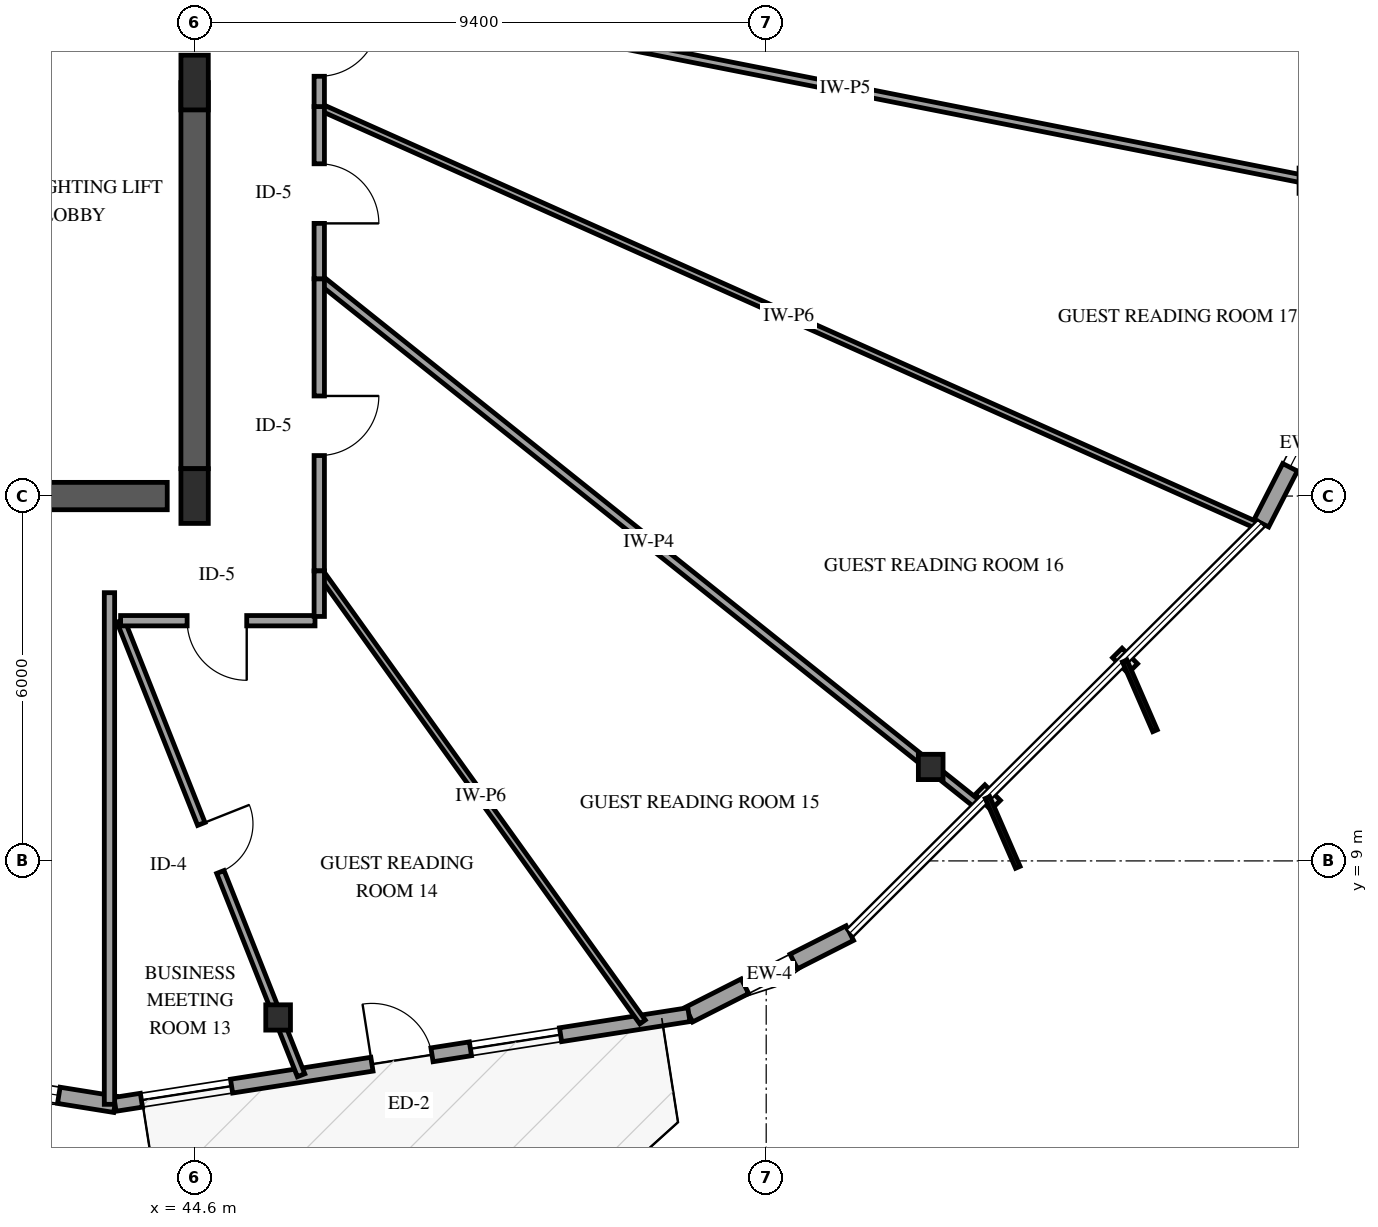
"""IFC4 building model, lengths in metres.
Left out: names, types, materials, properties, quantities, classifications, styles, units other than length and angle.
Written with IfcOpenShell. Run it as: python <this file> out.ifc"""

import sys

from ifc_helpers import new_model, si_unit, direction, frame, frame_2d, origin, origin_2d, place, context, subcontext, project, spatial, rectangle, i_section, extrude, element, fill, save


model = new_model("IFC4")
c1 = context("Model", 3, precision=1e-05, world=origin(), true_north=direction((0.0, 1.0)))
c2 = subcontext(c1, "Body", "Model", "MODEL_VIEW")
j1 = project(units=[si_unit("LENGTHUNIT", "METRE"), si_unit("PLANEANGLEUNIT", "RADIAN")], contexts=[c1])
p1 = place(None, origin())
s1 = spatial("IfcSite", under=j1, at=p1, CompositionType="ELEMENT")
p2 = place(p1, origin())
s2 = spatial("IfcBuilding", under=s1, at=p2, CompositionType="ELEMENT")
p3 = place(p2, frame((0.0, 0.0, 197.8)))
s3 = spatial("IfcBuildingStorey", under=s2, at=p3, CompositionType="ELEMENT", Elevation=197.8)
p4 = place(p3, frame((41.3, 15.0, 0.0), z_axis=(0.0, 0.0, 1.0), x_axis=(1.0, 0.0, 0.0)))
e1 = element("IfcWall", 1, at=p4, inside=s3, PredefinedType="SHEAR", context=c2, shape_type="SweptSolid", body=[
    extrude(rectangle(XDim=2.85, YDim=0.45, at=frame_2d((1.425, 0.0))), origin(), (0.0, 0.0, 1.0), 3.6),
])
p5 = place(p3, frame((44.6, 15.45, 0.0), z_axis=(0.0, 0.0, 1.0), x_axis=(0.0, 1.0, 0.0)))
e2 = element("IfcWall", 2, at=p5, inside=s3, PredefinedType="SHEAR", context=c2, shape_type="SweptSolid", body=[
    extrude(rectangle(XDim=6.35, YDim=0.45, at=frame_2d((3.175, 0.0))), origin(), (0.0, 0.0, 1.0), 3.6),
])
for number, where, z_axis, x_axis in (
    (3, (44.6, 15.0, 0.0), (0.0, 0.0, 1.0), (1.0, 0.0, 0.0)),
    (4, (44.6, 21.8, 0.0), (0.0, 0.0, 1.0), (1.0, 0.0, 0.0)),
):
    element("IfcColumn", number, at=place(p3, frame(where, z_axis=z_axis, x_axis=x_axis)), inside=s3, PredefinedType="PILASTER", context=c2, shape_type="SweptSolid", body=[
        extrude(rectangle(XDim=0.45, YDim=0.9, at=origin_2d()), origin(), (0.0, 0.0, 1.0), 3.6),
    ])
for number, where, z_axis, x_axis in (
    (5, (45.973, 6.426, 0.0), (0.0, 0.0, 1.0), (1.0, 0.0, 0.0)),
    (6, (56.705, 10.545, 0.0), (0.0, 0.0, 1.0), (1.0, 0.0, 0.0)),
):
    element("IfcColumn", number, at=place(p3, frame(where, z_axis=z_axis, x_axis=x_axis)), inside=s3, PredefinedType="COLUMN", context=c2, shape_type="SweptSolid", body=[
        extrude(i_section(OverallWidth=0.406, OverallDepth=0.416, WebThickness=0.03, FlangeThickness=0.048, FilletRadius=0.038, at=origin_2d()), origin(), (0.0, 0.0, 1.0), 3.6),
    ])
p6 = place(p3, frame((40.362, 5.467, 0.0), z_axis=(0.0, 0.0, 1.0), x_axis=(0.987357295895, -0.158510473609, 0.0)))
e7 = element("IfcWall", 7, at=p6, inside=s3, PredefinedType="SOLIDWALL", context=c2, shape_type="SweptSolid", body=[
    extrude(rectangle(XDim=2.967, YDim=0.27, at=frame_2d((1.483, 0.0))), origin(), (0.0, 0.0, 1.0), 2.679),
])
p7 = place(p6, frame((1.131, 0.0, 0.75)))
e8 = element("IfcOpeningElement", 8, at=p7, cuts=e7, PredefinedType="OPENING", context=c2, shape_type="SweptSolid", body=[
    extrude(rectangle(XDim=0.9, YDim=1.5, at=frame_2d((0.45, 0.75))), frame((0.0, 0.145, 0.0), z_axis=(0.0, -1.0, 0.0), x_axis=(1.0, 0.0, 0.0)), (0.0, 0.0, 1.0), 0.29),
])
p8 = place(p3, frame((52.729, 6.471, 0.0), z_axis=(0.0, 0.0, 1.0), x_axis=(0.891944623655, 0.452144654213, 0.0)))
e9 = element("IfcWall", 9, at=p8, inside=s3, PredefinedType="SOLIDWALL", context=c2, shape_type="SweptSolid", body=[
    extrude(rectangle(XDim=2.967, YDim=0.27, at=frame_2d((1.483, 0.0))), origin(), (0.0, 0.0, 1.0), 2.679),
])
p9 = place(p8, frame((1.033, 0.0, 0.75)))
e10 = element("IfcOpeningElement", 10, at=p9, cuts=e9, PredefinedType="OPENING", context=c2, shape_type="SweptSolid", body=[
    extrude(rectangle(XDim=0.9, YDim=1.5, at=frame_2d((0.45, 0.75))), frame((0.0, 0.145, 0.0), z_axis=(0.0, -1.0, 0.0), x_axis=(1.0, 0.0, 0.0)), (0.0, 0.0, 1.0), 0.29),
])
p10 = place(p3, frame((43.291, 4.997, 0.0), z_axis=(0.0, 0.0, 1.0), x_axis=(0.988013251918, 0.154369083801, 0.0)))
e11 = element("IfcWall", 11, at=p10, inside=s3, PredefinedType="SOLIDWALL", context=c2, shape_type="SweptSolid", body=[
    extrude(rectangle(XDim=9.552, YDim=0.23, at=frame_2d((4.776, 0.0))), origin(), (0.0, 0.0, 1.0), 2.679),
])
p11 = place(p10, frame((4.276, 0.0, 0.0)))
e12 = element("IfcOpeningElement", 12, at=p11, cuts=e11, PredefinedType="OPENING", context=c2, shape_type="SweptSolid", body=[
    extrude(rectangle(XDim=1.0, YDim=2.15, at=frame_2d((0.5, 1.075))), frame((0.0, 0.125, 0.0), z_axis=(0.0, -1.0, 0.0), x_axis=(1.0, 0.0, 0.0)), (0.0, 0.0, 1.0), 0.25),
])
p12 = place(p10, frame((0.44, 0.0, 0.72)))
e13 = element("IfcOpeningElement", 13, at=p12, cuts=e11, PredefinedType="OPENING", context=c2, shape_type="SweptSolid", body=[
    extrude(rectangle(XDim=1.5, YDim=1.7, at=frame_2d((0.75, 0.85))), frame((0.0, 0.125, 0.0), z_axis=(0.0, -1.0, 0.0), x_axis=(1.0, 0.0, 0.0)), (0.0, 0.0, 1.0), 0.25),
])
p13 = place(p10, frame((5.916, 0.0, 0.72)))
e14 = element("IfcOpeningElement", 14, at=p13, cuts=e11, PredefinedType="OPENING", context=c2, shape_type="SweptSolid", body=[
    extrude(rectangle(XDim=1.5, YDim=1.7, at=frame_2d((0.75, 0.85))), frame((0.0, 0.125, 0.0), z_axis=(0.0, -1.0, 0.0), x_axis=(1.0, 0.0, 0.0)), (0.0, 0.0, 1.0), 0.25),
])
p14 = place(p3, frame((62.144, 14.553, 0.0), z_axis=(0.0, 0.0, 1.0), x_axis=(0.455850427724, 0.89005639571, 0.0)))
e15 = element("IfcWall", 15, at=p14, inside=s3, PredefinedType="SOLIDWALL", context=c2, shape_type="SweptSolid", body=[
    extrude(rectangle(XDim=2.967, YDim=0.27, at=frame_2d((1.483, 0.0))), origin(), (0.0, 0.0, 1.0), 2.679),
])
p15 = place(p14, frame((1.033, 0.0, 0.75)))
e16 = element("IfcOpeningElement", 16, at=p15, cuts=e15, PredefinedType="OPENING", context=c2, shape_type="SweptSolid", body=[
    extrude(rectangle(XDim=0.9, YDim=1.5, at=frame_2d((0.45, 0.75))), frame((0.0, 0.145, 0.0), z_axis=(0.0, -1.0, 0.0), x_axis=(1.0, 0.0, 0.0)), (0.0, 0.0, 1.0), 0.29),
])
p16 = place(p3, frame((46.65, 23.41, 0.0), z_axis=(0.0, 0.0, 1.0), x_axis=(0.981026056524, -0.193875930483, 0.0)))
e17 = element("IfcWall", 17, at=p16, inside=s3, PredefinedType="PARTITIONING", context=c2, shape_type="SweptSolid", body=[
    extrude(rectangle(XDim=17.63, YDim=0.13, at=frame_2d((8.815, 0.0))), origin(), (0.0, 0.0, 1.0), 2.595),
])
p17 = place(p3, frame((46.65, 21.405, 0.0), z_axis=(0.0, 0.0, 1.0), x_axis=(0.913073312597, -0.407795446055, 0.0)))
e18 = element("IfcWall", 18, at=p17, inside=s3, PredefinedType="PARTITIONING", context=c2, shape_type="SweptSolid", body=[
    extrude(rectangle(XDim=16.918, YDim=0.11, at=frame_2d((8.459, 0.0))), origin(), (0.0, 0.0, 1.0), 3.3),
])
p18 = place(p3, frame((46.65, 18.573, 0.0), z_axis=(0.0, 0.0, 1.0), x_axis=(0.781502043787, -0.623902681158, 0.0)))
e19 = element("IfcWall", 19, at=p18, inside=s3, PredefinedType="PARTITIONING", context=c2, shape_type="SweptSolid", body=[
    extrude(rectangle(XDim=13.871, YDim=0.14, at=frame_2d((6.936, 0.0))), origin(), (0.0, 0.0, 1.0), 3.3),
])
p19 = place(p3, frame((46.65, 13.769, 0.0), z_axis=(0.0, 0.0, 1.0), x_axis=(0.582566075225, -0.812783346284, 0.0)))
e20 = element("IfcWall", 20, at=p19, inside=s3, PredefinedType="PARTITIONING", context=c2, shape_type="SweptSolid", body=[
    extrude(rectangle(XDim=9.125, YDim=0.11, at=frame_2d((4.563, 0.0))), origin(), (0.0, 0.0, 1.0), 2.678),
])
p20 = place(p3, frame((43.383, 12.95, 0.0), z_axis=(0.0, 0.0, 1.0), x_axis=(0.369039503421, -0.929413710311, 0.0)))
e21 = element("IfcWall", 21, at=p20, inside=s3, PredefinedType="PARTITIONING", context=c2, shape_type="SweptSolid", body=[
    extrude(rectangle(XDim=8.042, YDim=0.13, at=frame_2d((4.021, 0.0))), origin(), (0.0, 0.0, 1.0), 2.595),
])
p21 = place(p20, frame((3.596, 0.0, 0.0)))
e22 = element("IfcOpeningElement", 22, at=p21, cuts=e21, PredefinedType="OPENING", context=c2, shape_type="SweptSolid", body=[
    extrude(rectangle(XDim=0.85, YDim=2.1, at=frame_2d((0.425, 1.05))), frame((0.0, 0.075, 0.0), z_axis=(0.0, -1.0, 0.0), x_axis=(1.0, 0.0, 0.0)), (0.0, 0.0, 1.0), 0.15),
])
p22 = place(p3, frame((46.65, 18.573, 0.0), z_axis=(0.0, 0.0, 1.0), x_axis=(0.0, -1.0, 0.0)))
e23 = element("IfcWall", 23, at=p22, inside=s3, PredefinedType="PARTITIONING", context=c2, shape_type="SweptSolid", body=[
    extrude(rectangle(XDim=4.804, YDim=0.17, at=frame_2d((2.402, 0.0))), origin(), (0.0, 0.0, 1.0), 3.3),
])
p23 = place(p22, frame((1.927, 0.0, 0.0)))
e24 = element("IfcOpeningElement", 24, at=p23, cuts=e23, PredefinedType="OPENING", context=c2, shape_type="SweptSolid", body=[
    extrude(rectangle(XDim=0.98, YDim=2.15, at=frame_2d((0.49, 1.075))), frame((0.0, 0.095, 0.0), z_axis=(0.0, -1.0, 0.0), x_axis=(1.0, 0.0, 0.0)), (0.0, 0.0, 1.0), 0.19),
])
p24 = place(p3, frame((46.58, 12.95, 0.0), z_axis=(0.0, 0.0, 1.0), x_axis=(-1.0, 0.0, 0.0)))
e25 = element("IfcWall", 25, at=p24, inside=s3, PredefinedType="PARTITIONING", context=c2, shape_type="SweptSolid", body=[
    extrude(rectangle(XDim=3.197, YDim=0.17, at=frame_2d((1.599, 0.0))), origin(), (0.0, 0.0, 1.0), 3.3),
])
p25 = place(p24, frame((1.123, 0.0, 0.0)))
e26 = element("IfcOpeningElement", 26, at=p25, cuts=e25, PredefinedType="OPENING", context=c2, shape_type="SweptSolid", body=[
    extrude(rectangle(XDim=0.98, YDim=2.15, at=frame_2d((0.49, 1.075))), frame((0.0, 0.095, 0.0), z_axis=(0.0, -1.0, 0.0), x_axis=(1.0, 0.0, 0.0)), (0.0, 0.0, 1.0), 0.19),
])
p26 = place(p3, frame((46.65, 21.405, 0.0), z_axis=(0.0, 0.0, 1.0), x_axis=(0.0, -1.0, 0.0)))
e27 = element("IfcWall", 27, at=p26, inside=s3, PredefinedType="PARTITIONING", context=c2, shape_type="SweptSolid", body=[
    extrude(rectangle(XDim=2.832, YDim=0.17, at=frame_2d((1.416, 0.0))), origin(), (0.0, 0.0, 1.0), 3.3),
])
p27 = place(p26, frame((0.941, 0.0, 0.0)))
e28 = element("IfcOpeningElement", 28, at=p27, cuts=e27, PredefinedType="OPENING", context=c2, shape_type="SweptSolid", body=[
    extrude(rectangle(XDim=0.98, YDim=2.15, at=frame_2d((0.49, 1.075))), frame((0.0, 0.095, 0.0), z_axis=(0.0, -1.0, 0.0), x_axis=(1.0, 0.0, 0.0)), (0.0, 0.0, 1.0), 0.19),
])
p28 = place(p3, frame((46.65, 23.41, 0.0), z_axis=(0.0, 0.0, 1.0), x_axis=(0.0, -1.0, 0.0)))
e29 = element("IfcWall", 29, at=p28, inside=s3, PredefinedType="PARTITIONING", context=c2, shape_type="SweptSolid", body=[
    extrude(rectangle(XDim=2.005, YDim=0.17, at=frame_2d((1.002, 0.0))), origin(), (0.0, 0.0, 1.0), 3.3),
])
p29 = place(p28, frame((0.527, 0.0, 0.0)))
e30 = element("IfcOpeningElement", 30, at=p29, cuts=e29, PredefinedType="OPENING", context=c2, shape_type="SweptSolid", body=[
    extrude(rectangle(XDim=0.98, YDim=2.15, at=frame_2d((0.49, 1.075))), frame((0.0, 0.095, 0.0), z_axis=(0.0, -1.0, 0.0), x_axis=(1.0, 0.0, 0.0)), (0.0, 0.0, 1.0), 0.19),
])
p30 = place(p3, frame((46.65, 13.769, 0.0), z_axis=(0.0, 0.0, 1.0), x_axis=(0.0, -1.0, 0.0)))
e31 = element("IfcWall", 31, at=p30, inside=s3, PredefinedType="PARTITIONING", context=c2, shape_type="SweptSolid", body=[
    extrude(rectangle(XDim=0.749, YDim=0.17, at=frame_2d((0.375, 0.0))), origin(), (0.0, 0.0, 1.0), 3.3),
])
p31 = place(p3, frame((43.2, 13.411, 0.0), z_axis=(0.0, 0.0, 1.0), x_axis=(0.0, -1.0, 0.0)))
e32 = element("IfcWall", 32, at=p31, inside=s3, PredefinedType="PARTITIONING", context=c2, shape_type="SweptSolid", body=[
    extrude(rectangle(XDim=8.414, YDim=0.17, at=frame_2d((4.207, 0.0))), origin(), (0.0, 0.0, 1.0), 2.678),
])
p32 = place(p7, origin())
e33 = element("IfcWindow", 33, at=p32, inside=s3, PartitioningType="SINGLE_PANEL", PredefinedType="WINDOW", context=c2, shape_type="SweptSolid", body=[
    extrude(rectangle(XDim=0.9, YDim=1.5, at=frame_2d((0.45, 0.75))), frame((0.0, 0.03, 0.0), z_axis=(0.0, -1.0, 0.0), x_axis=(1.0, 0.0, 0.0)), (0.0, 0.0, 1.0), 0.06),
])
fill(e8, e33)
p33 = place(p9, origin())
e34 = element("IfcWindow", 34, at=p33, inside=s3, PartitioningType="SINGLE_PANEL", PredefinedType="WINDOW", context=c2, shape_type="SweptSolid", body=[
    extrude(rectangle(XDim=0.9, YDim=1.5, at=frame_2d((0.45, 0.75))), frame((0.0, 0.03, 0.0), z_axis=(0.0, -1.0, 0.0), x_axis=(1.0, 0.0, 0.0)), (0.0, 0.0, 1.0), 0.06),
])
fill(e10, e34)
p34 = place(p11, origin())
e35 = element("IfcDoor", 35, at=p34, inside=s3, OperationType="SINGLE_SWING_LEFT", PredefinedType="DOOR", context=c2, shape_type="SweptSolid", body=[
    extrude(rectangle(XDim=1.0, YDim=2.15, at=frame_2d((0.5, 1.075))), frame((0.0, 0.025, 0.0), z_axis=(0.0, -1.0, 0.0), x_axis=(1.0, 0.0, 0.0)), (0.0, 0.0, 1.0), 0.05),
])
fill(e12, e35)
p35 = place(p12, origin())
e36 = element("IfcWindow", 36, at=p35, inside=s3, PartitioningType="SINGLE_PANEL", PredefinedType="WINDOW", context=c2, shape_type="SweptSolid", body=[
    extrude(rectangle(XDim=1.5, YDim=1.7, at=frame_2d((0.75, 0.85))), frame((0.0, 0.03, 0.0), z_axis=(0.0, -1.0, 0.0), x_axis=(1.0, 0.0, 0.0)), (0.0, 0.0, 1.0), 0.06),
])
fill(e13, e36)
p36 = place(p13, origin())
e37 = element("IfcWindow", 37, at=p36, inside=s3, PartitioningType="SINGLE_PANEL", PredefinedType="WINDOW", context=c2, shape_type="SweptSolid", body=[
    extrude(rectangle(XDim=1.5, YDim=1.7, at=frame_2d((0.75, 0.85))), frame((0.0, 0.03, 0.0), z_axis=(0.0, -1.0, 0.0), x_axis=(1.0, 0.0, 0.0)), (0.0, 0.0, 1.0), 0.06),
])
fill(e14, e37)
p37 = place(p15, origin())
e38 = element("IfcWindow", 38, at=p37, inside=s3, PartitioningType="SINGLE_PANEL", PredefinedType="WINDOW", context=c2, shape_type="SweptSolid", body=[
    extrude(rectangle(XDim=0.9, YDim=1.5, at=frame_2d((0.45, 0.75))), frame((0.0, 0.03, 0.0), z_axis=(0.0, -1.0, 0.0), x_axis=(1.0, 0.0, 0.0)), (0.0, 0.0, 1.0), 0.06),
])
fill(e16, e38)
p38 = place(p21, origin())
e39 = element("IfcDoor", 39, at=p38, inside=s3, OperationType="SINGLE_SWING_LEFT", PredefinedType="DOOR", context=c2, shape_type="SweptSolid", body=[
    extrude(rectangle(XDim=0.85, YDim=2.1, at=frame_2d((0.425, 1.05))), frame((0.0, 0.025, 0.0), z_axis=(0.0, -1.0, 0.0), x_axis=(1.0, 0.0, 0.0)), (0.0, 0.0, 1.0), 0.05),
])
fill(e22, e39)
p39 = place(p23, origin())
e40 = element("IfcDoor", 40, at=p39, inside=s3, OperationType="SINGLE_SWING_LEFT", PredefinedType="DOOR", context=c2, shape_type="SweptSolid", body=[
    extrude(rectangle(XDim=0.98, YDim=2.15, at=frame_2d((0.49, 1.075))), frame((0.0, 0.025, 0.0), z_axis=(0.0, -1.0, 0.0), x_axis=(1.0, 0.0, 0.0)), (0.0, 0.0, 1.0), 0.05),
])
fill(e24, e40)
p40 = place(p25, origin())
e41 = element("IfcDoor", 41, at=p40, inside=s3, OperationType="SINGLE_SWING_LEFT", PredefinedType="DOOR", context=c2, shape_type="SweptSolid", body=[
    extrude(rectangle(XDim=0.98, YDim=2.15, at=frame_2d((0.49, 1.075))), frame((0.0, 0.025, 0.0), z_axis=(0.0, -1.0, 0.0), x_axis=(1.0, 0.0, 0.0)), (0.0, 0.0, 1.0), 0.05),
])
fill(e26, e41)
p41 = place(p27, origin())
e42 = element("IfcDoor", 42, at=p41, inside=s3, OperationType="SINGLE_SWING_RIGHT", PredefinedType="DOOR", context=c2, shape_type="SweptSolid", body=[
    extrude(rectangle(XDim=0.98, YDim=2.15, at=frame_2d((0.49, 1.075))), frame((0.0, 0.025, 0.0), z_axis=(0.0, -1.0, 0.0), x_axis=(1.0, 0.0, 0.0)), (0.0, 0.0, 1.0), 0.05),
])
fill(e28, e42)
p42 = place(p29, origin())
e43 = element("IfcDoor", 43, at=p42, inside=s3, OperationType="SINGLE_SWING_LEFT", PredefinedType="DOOR", context=c2, shape_type="SweptSolid", body=[
    extrude(rectangle(XDim=0.98, YDim=2.15, at=frame_2d((0.49, 1.075))), frame((0.0, 0.025, 0.0), z_axis=(0.0, -1.0, 0.0), x_axis=(1.0, 0.0, 0.0)), (0.0, 0.0, 1.0), 0.05),
])
fill(e30, e43)
save(model, sys.argv[1])
